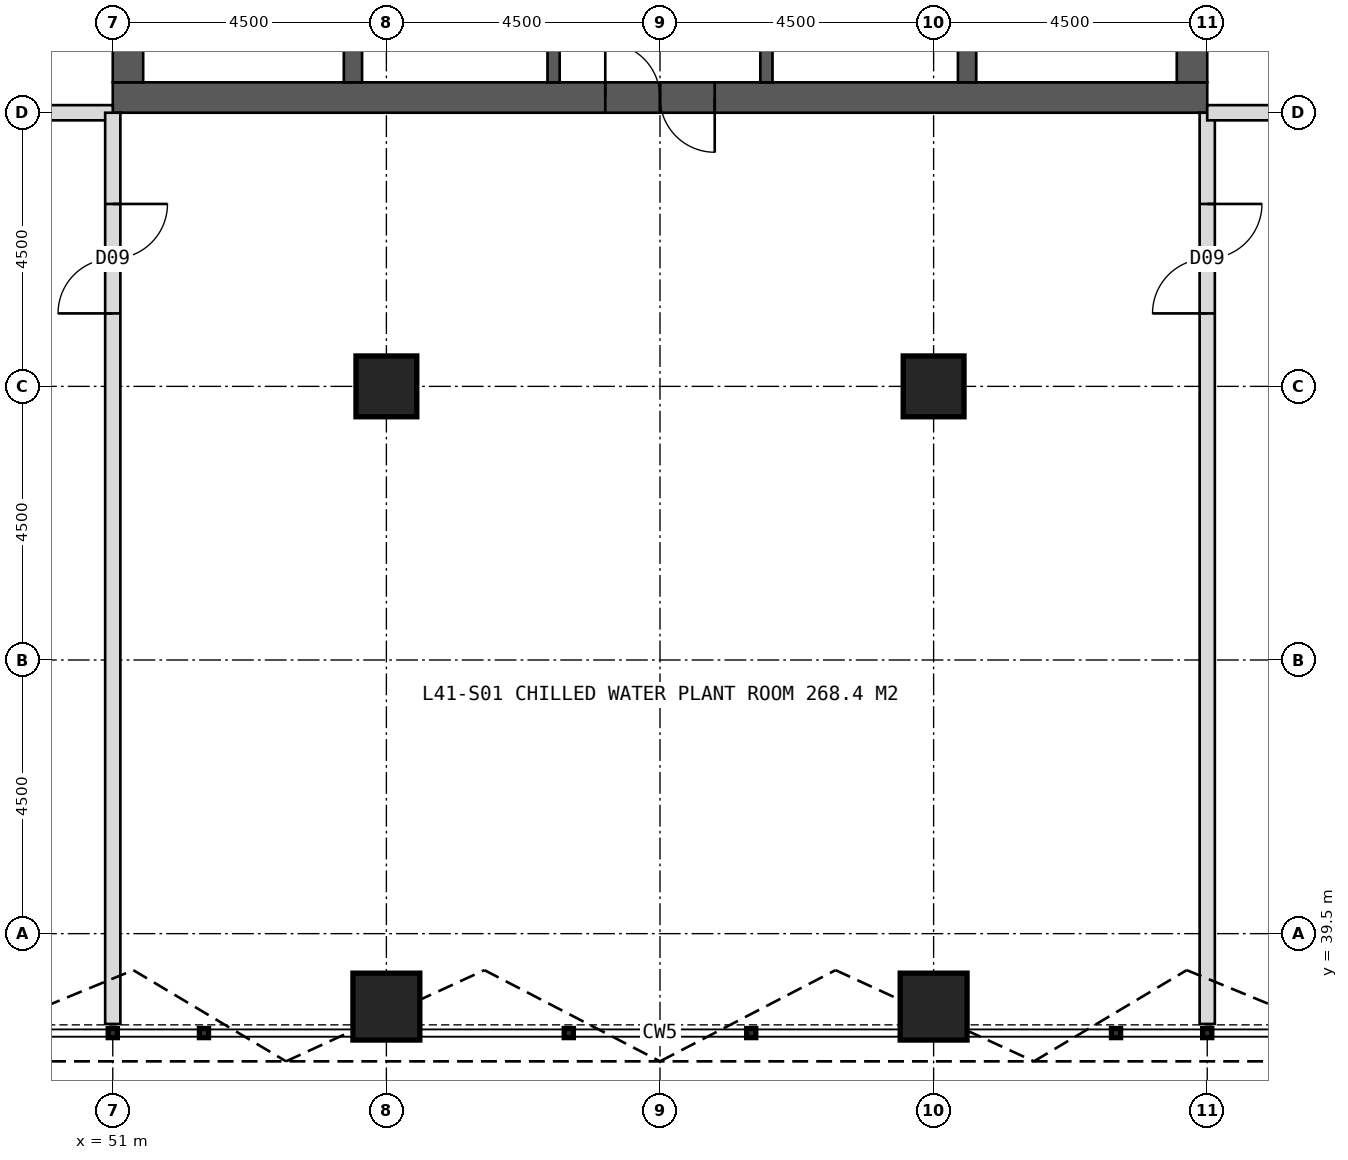
"""IFC4 building model, lengths in metres.
Left out: names, types, materials, properties, quantities, classifications, styles, units other than length and angle.
Written with IfcOpenShell. Run it as: python <this file> out.ifc"""

import sys

from ifc_helpers import new_model, si_unit, direction, frame, frame_2d, origin, origin_2d, place, context, subcontext, project, spatial, rectangle, hollow_rectangle, extrude, element, fill, save


model = new_model("IFC4")
c1 = context("Model", 3, precision=1e-05, world=origin(), true_north=direction((0.0, 1.0)))
c2 = subcontext(c1, "Body", "Model", "MODEL_VIEW")
j1 = project(units=[si_unit("LENGTHUNIT", "METRE"), si_unit("PLANEANGLEUNIT", "RADIAN")], contexts=[c1])
p1 = place(None, origin())
s1 = spatial("IfcSite", under=j1, at=p1, CompositionType="ELEMENT")
p2 = place(p1, origin())
s2 = spatial("IfcBuilding", under=s1, at=p2, CompositionType="ELEMENT")
p3 = place(p2, frame((0.0, 0.0, 172.0)))
s3 = spatial("IfcBuildingStorey", under=s2, at=p3, CompositionType="ELEMENT", Elevation=172.0)
p4 = place(p3, frame((51.0, 53.25, 0.0), z_axis=(0.0, 0.0, 1.0), x_axis=(1.0, 0.0, 0.0)))
e1 = element("IfcWall", 1, at=p4, inside=s3, PredefinedType="SHEAR", context=c2, shape_type="SweptSolid", body=[
    extrude(rectangle(XDim=18.0, YDim=0.5, at=frame_2d((9.0, 0.0))), origin(), (0.0, 0.0, 1.0), 5.0),
])
p5 = place(p4, frame((8.1, 0.0, 0.0)))
e2 = element("IfcOpeningElement", 2, at=p5, cuts=e1, PredefinedType="OPENING", context=c2, shape_type="SweptSolid", body=[
    extrude(rectangle(XDim=1.8, YDim=2.2, at=frame_2d((0.9, 1.1))), frame((0.0, 0.26, 0.0), z_axis=(0.0, -1.0, 0.0), x_axis=(1.0, 0.0, 0.0)), (0.0, 0.0, 1.0), 0.52),
])
p6 = place(p3, frame((51.25, 53.5, 0.0), z_axis=(0.0, 0.0, 1.0), x_axis=(0.0, 1.0, 0.0)))
e3 = element("IfcWall", 3, at=p6, inside=s3, PredefinedType="SHEAR", context=c2, shape_type="SweptSolid", body=[
    extrude(rectangle(XDim=17.0, YDim=0.5, at=frame_2d((8.5, 0.0))), origin(), (0.0, 0.0, 1.0), 5.0),
])
p7 = place(p6, frame((6.0, 0.0, 0.0)))
e4 = element("IfcOpeningElement", 4, at=p7, cuts=e3, PredefinedType="OPENING", context=c2, shape_type="SweptSolid", body=[
    extrude(rectangle(XDim=1.5, YDim=2.2, at=frame_2d((0.75, 1.1))), frame((0.0, 0.26, 0.0), z_axis=(0.0, -1.0, 0.0), x_axis=(1.0, 0.0, 0.0)), (0.0, 0.0, 1.0), 0.52),
])
p8 = place(p3, frame((68.75, 53.5, 0.0), z_axis=(0.0, 0.0, 1.0), x_axis=(0.0, 1.0, 0.0)))
e5 = element("IfcWall", 5, at=p8, inside=s3, PredefinedType="SHEAR", context=c2, shape_type="SweptSolid", body=[
    extrude(rectangle(XDim=17.0, YDim=0.5, at=frame_2d((8.5, 0.0))), origin(), (0.0, 0.0, 1.0), 5.0),
])
p9 = place(p8, frame((9.5, 0.0, 0.0)))
e6 = element("IfcOpeningElement", 6, at=p9, cuts=e5, PredefinedType="OPENING", context=c2, shape_type="SweptSolid", body=[
    extrude(rectangle(XDim=1.5, YDim=2.2, at=frame_2d((0.75, 1.1))), frame((0.0, 0.26, 0.0), z_axis=(0.0, -1.0, 0.0), x_axis=(1.0, 0.0, 0.0)), (0.0, 0.0, 1.0), 0.52),
])
for number, where, z_axis, x_axis in (
    (7, (54.95, 53.5, 0.0), (0.0, 0.0, 1.0), (0.0, 1.0, 0.0)),
    (8, (65.05, 53.5, 0.0), (0.0, 0.0, 1.0), (0.0, 1.0, 0.0)),
):
    element("IfcWall", number, at=place(p3, frame(where, z_axis=z_axis, x_axis=x_axis)), inside=s3, PredefinedType="SHEAR", context=c2, shape_type="SweptSolid", body=[
        extrude(rectangle(XDim=17.0, YDim=0.3, at=frame_2d((8.5, 0.0))), origin(), (0.0, 0.0, 1.0), 5.0),
    ])
for number, where, z_axis, x_axis in (
    (9, (58.25, 53.5, 0.0), (0.0, 0.0, 1.0), (0.0, 1.0, 0.0)),
    (10, (61.75, 53.5, 0.0), (0.0, 0.0, 1.0), (0.0, 1.0, 0.0)),
):
    element("IfcWall", number, at=place(p3, frame(where, z_axis=z_axis, x_axis=x_axis)), inside=s3, PredefinedType="SHEAR", context=c2, shape_type="SweptSolid", body=[
        extrude(rectangle(XDim=17.0, YDim=0.2, at=frame_2d((8.5, 0.0))), origin(), (0.0, 0.0, 1.0), 5.0),
    ])
for number, where, z_axis, x_axis in (
    (11, (55.5, 48.5, 0.0), (0.0, 0.0, 1.0), (1.0, 0.0, 0.0)),
    (12, (64.5, 48.5, 0.0), (0.0, 0.0, 1.0), (1.0, 0.0, 0.0)),
):
    element("IfcColumn", number, at=place(p3, frame(where, z_axis=z_axis, x_axis=x_axis)), inside=s3, PredefinedType="COLUMN", context=c2, shape_type="SweptSolid", body=[
        extrude(hollow_rectangle(XDim=1.0, YDim=1.0, WallThickness=0.1, at=origin_2d()), origin(), (0.0, 0.0, 1.0), 5.0),
    ])
for number, where, z_axis, x_axis in (
    (13, (55.5, 38.3, 0.0), (0.0, 0.0, 1.0), (1.0, 0.0, 0.0)),
    (14, (64.5, 38.3, 0.0), (0.0, 0.0, 1.0), (1.0, 0.0, 0.0)),
):
    element("IfcColumn", number, at=place(p3, frame(where, z_axis=z_axis, x_axis=x_axis)), inside=s3, PredefinedType="COLUMN", context=c2, shape_type="SweptSolid", body=[
        extrude(hollow_rectangle(XDim=1.1, YDim=1.1, WallThickness=0.1, at=origin_2d()), origin(), (0.0, 0.0, 1.0), 5.0),
    ])
p10 = place(p3, frame((51.0, 53.0, 0.0), z_axis=(0.0, 0.0, 1.0), x_axis=(-1.0, 0.0, 0.0)))
e15 = element("IfcWall", 15, at=p10, inside=s3, PredefinedType="SOLIDWALL", context=c2, shape_type="SweptSolid", body=[
    extrude(rectangle(XDim=14.985, YDim=0.25, at=frame_2d((7.493, 0.0))), origin(), (0.0, 0.0, 1.0), 4.75),
])
p11 = place(p10, frame((1.5, 0.0, 0.0)))
e16 = element("IfcOpeningElement", 16, at=p11, cuts=e15, PredefinedType="OPENING", context=c2, shape_type="SweptSolid", body=[
    extrude(rectangle(XDim=1.8, YDim=2.2, at=frame_2d((0.9, 1.1))), frame((0.0, 0.135, 0.0), z_axis=(0.0, -1.0, 0.0), x_axis=(1.0, 0.0, 0.0)), (0.0, 0.0, 1.0), 0.27),
])
p12 = place(p3, frame((51.0, 53.0, 0.0), z_axis=(0.0, 0.0, 1.0), x_axis=(0.0, -1.0, 0.0)))
e17 = element("IfcWall", 17, at=p12, inside=s3, PredefinedType="SOLIDWALL", context=c2, shape_type="SweptSolid", body=[
    extrude(rectangle(XDim=14.985, YDim=0.25, at=frame_2d((7.493, 0.0))), origin(), (0.0, 0.0, 1.0), 4.75),
])
p13 = place(p12, frame((1.5, 0.0, 0.0)))
e18 = element("IfcOpeningElement", 18, at=p13, cuts=e17, PredefinedType="OPENING", context=c2, shape_type="SweptSolid", body=[
    extrude(rectangle(XDim=1.8, YDim=2.2, at=frame_2d((0.9, 1.1))), frame((0.0, 0.135, 0.0), z_axis=(0.0, -1.0, 0.0), x_axis=(1.0, 0.0, 0.0)), (0.0, 0.0, 1.0), 0.27),
])
p14 = place(p3, frame((69.0, 53.0, 0.0), z_axis=(0.0, 0.0, 1.0), x_axis=(0.0, -1.0, 0.0)))
e19 = element("IfcWall", 19, at=p14, inside=s3, PredefinedType="SOLIDWALL", context=c2, shape_type="SweptSolid", body=[
    extrude(rectangle(XDim=14.985, YDim=0.25, at=frame_2d((7.493, 0.0))), origin(), (0.0, 0.0, 1.0), 4.75),
])
p15 = place(p14, frame((1.5, 0.0, 0.0)))
e20 = element("IfcOpeningElement", 20, at=p15, cuts=e19, PredefinedType="OPENING", context=c2, shape_type="SweptSolid", body=[
    extrude(rectangle(XDim=1.8, YDim=2.2, at=frame_2d((0.9, 1.1))), frame((0.0, 0.135, 0.0), z_axis=(0.0, -1.0, 0.0), x_axis=(1.0, 0.0, 0.0)), (0.0, 0.0, 1.0), 0.27),
])
p16 = place(p3, frame((69.0, 53.0, 0.0), z_axis=(0.0, 0.0, 1.0), x_axis=(1.0, 0.0, 0.0)))
e21 = element("IfcWall", 21, at=p16, inside=s3, PredefinedType="SOLIDWALL", context=c2, shape_type="SweptSolid", body=[
    extrude(rectangle(XDim=14.985, YDim=0.25, at=frame_2d((7.493, 0.0))), origin(), (0.0, 0.0, 1.0), 4.75),
])
p17 = place(p16, frame((1.5, 0.0, 0.0)))
e22 = element("IfcOpeningElement", 22, at=p17, cuts=e21, PredefinedType="OPENING", context=c2, shape_type="SweptSolid", body=[
    extrude(rectangle(XDim=1.8, YDim=2.2, at=frame_2d((0.9, 1.1))), frame((0.0, 0.135, 0.0), z_axis=(0.0, -1.0, 0.0), x_axis=(1.0, 0.0, 0.0)), (0.0, 0.0, 1.0), 0.27),
])
p18 = place(p13, origin())
e23 = element("IfcDoor", 23, at=p18, inside=s3, OperationType="DOUBLE_DOOR_SINGLE_SWING", PredefinedType="DOOR", context=c2, shape_type="SweptSolid", body=[
    extrude(rectangle(XDim=1.8, YDim=2.2, at=frame_2d((0.9, 1.1))), frame((0.0, 0.025, 0.0), z_axis=(0.0, -1.0, 0.0), x_axis=(1.0, 0.0, 0.0)), (0.0, 0.0, 1.0), 0.05),
])
fill(e18, e23)
p19 = place(p15, origin())
e24 = element("IfcDoor", 24, at=p19, inside=s3, OperationType="DOUBLE_DOOR_SINGLE_SWING", PredefinedType="DOOR", context=c2, shape_type="SweptSolid", body=[
    extrude(rectangle(XDim=1.8, YDim=2.2, at=frame_2d((0.9, 1.1))), frame((0.0, 0.025, 0.0), z_axis=(0.0, -1.0, 0.0), x_axis=(1.0, 0.0, 0.0)), (0.0, 0.0, 1.0), 0.05),
])
fill(e20, e24)
p20 = place(p5, origin())
e25 = element("IfcDoor", 25, at=p20, inside=s3, OperationType="DOUBLE_DOOR_SINGLE_SWING", PredefinedType="DOOR", context=c2, shape_type="SweptSolid", body=[
    extrude(rectangle(XDim=1.8, YDim=2.2, at=frame_2d((0.9, 1.1))), frame((0.0, 0.025, 0.0), z_axis=(0.0, -1.0, 0.0), x_axis=(1.0, 0.0, 0.0)), (0.0, 0.0, 1.0), 0.05),
])
fill(e2, e25)
save(model, sys.argv[1])
